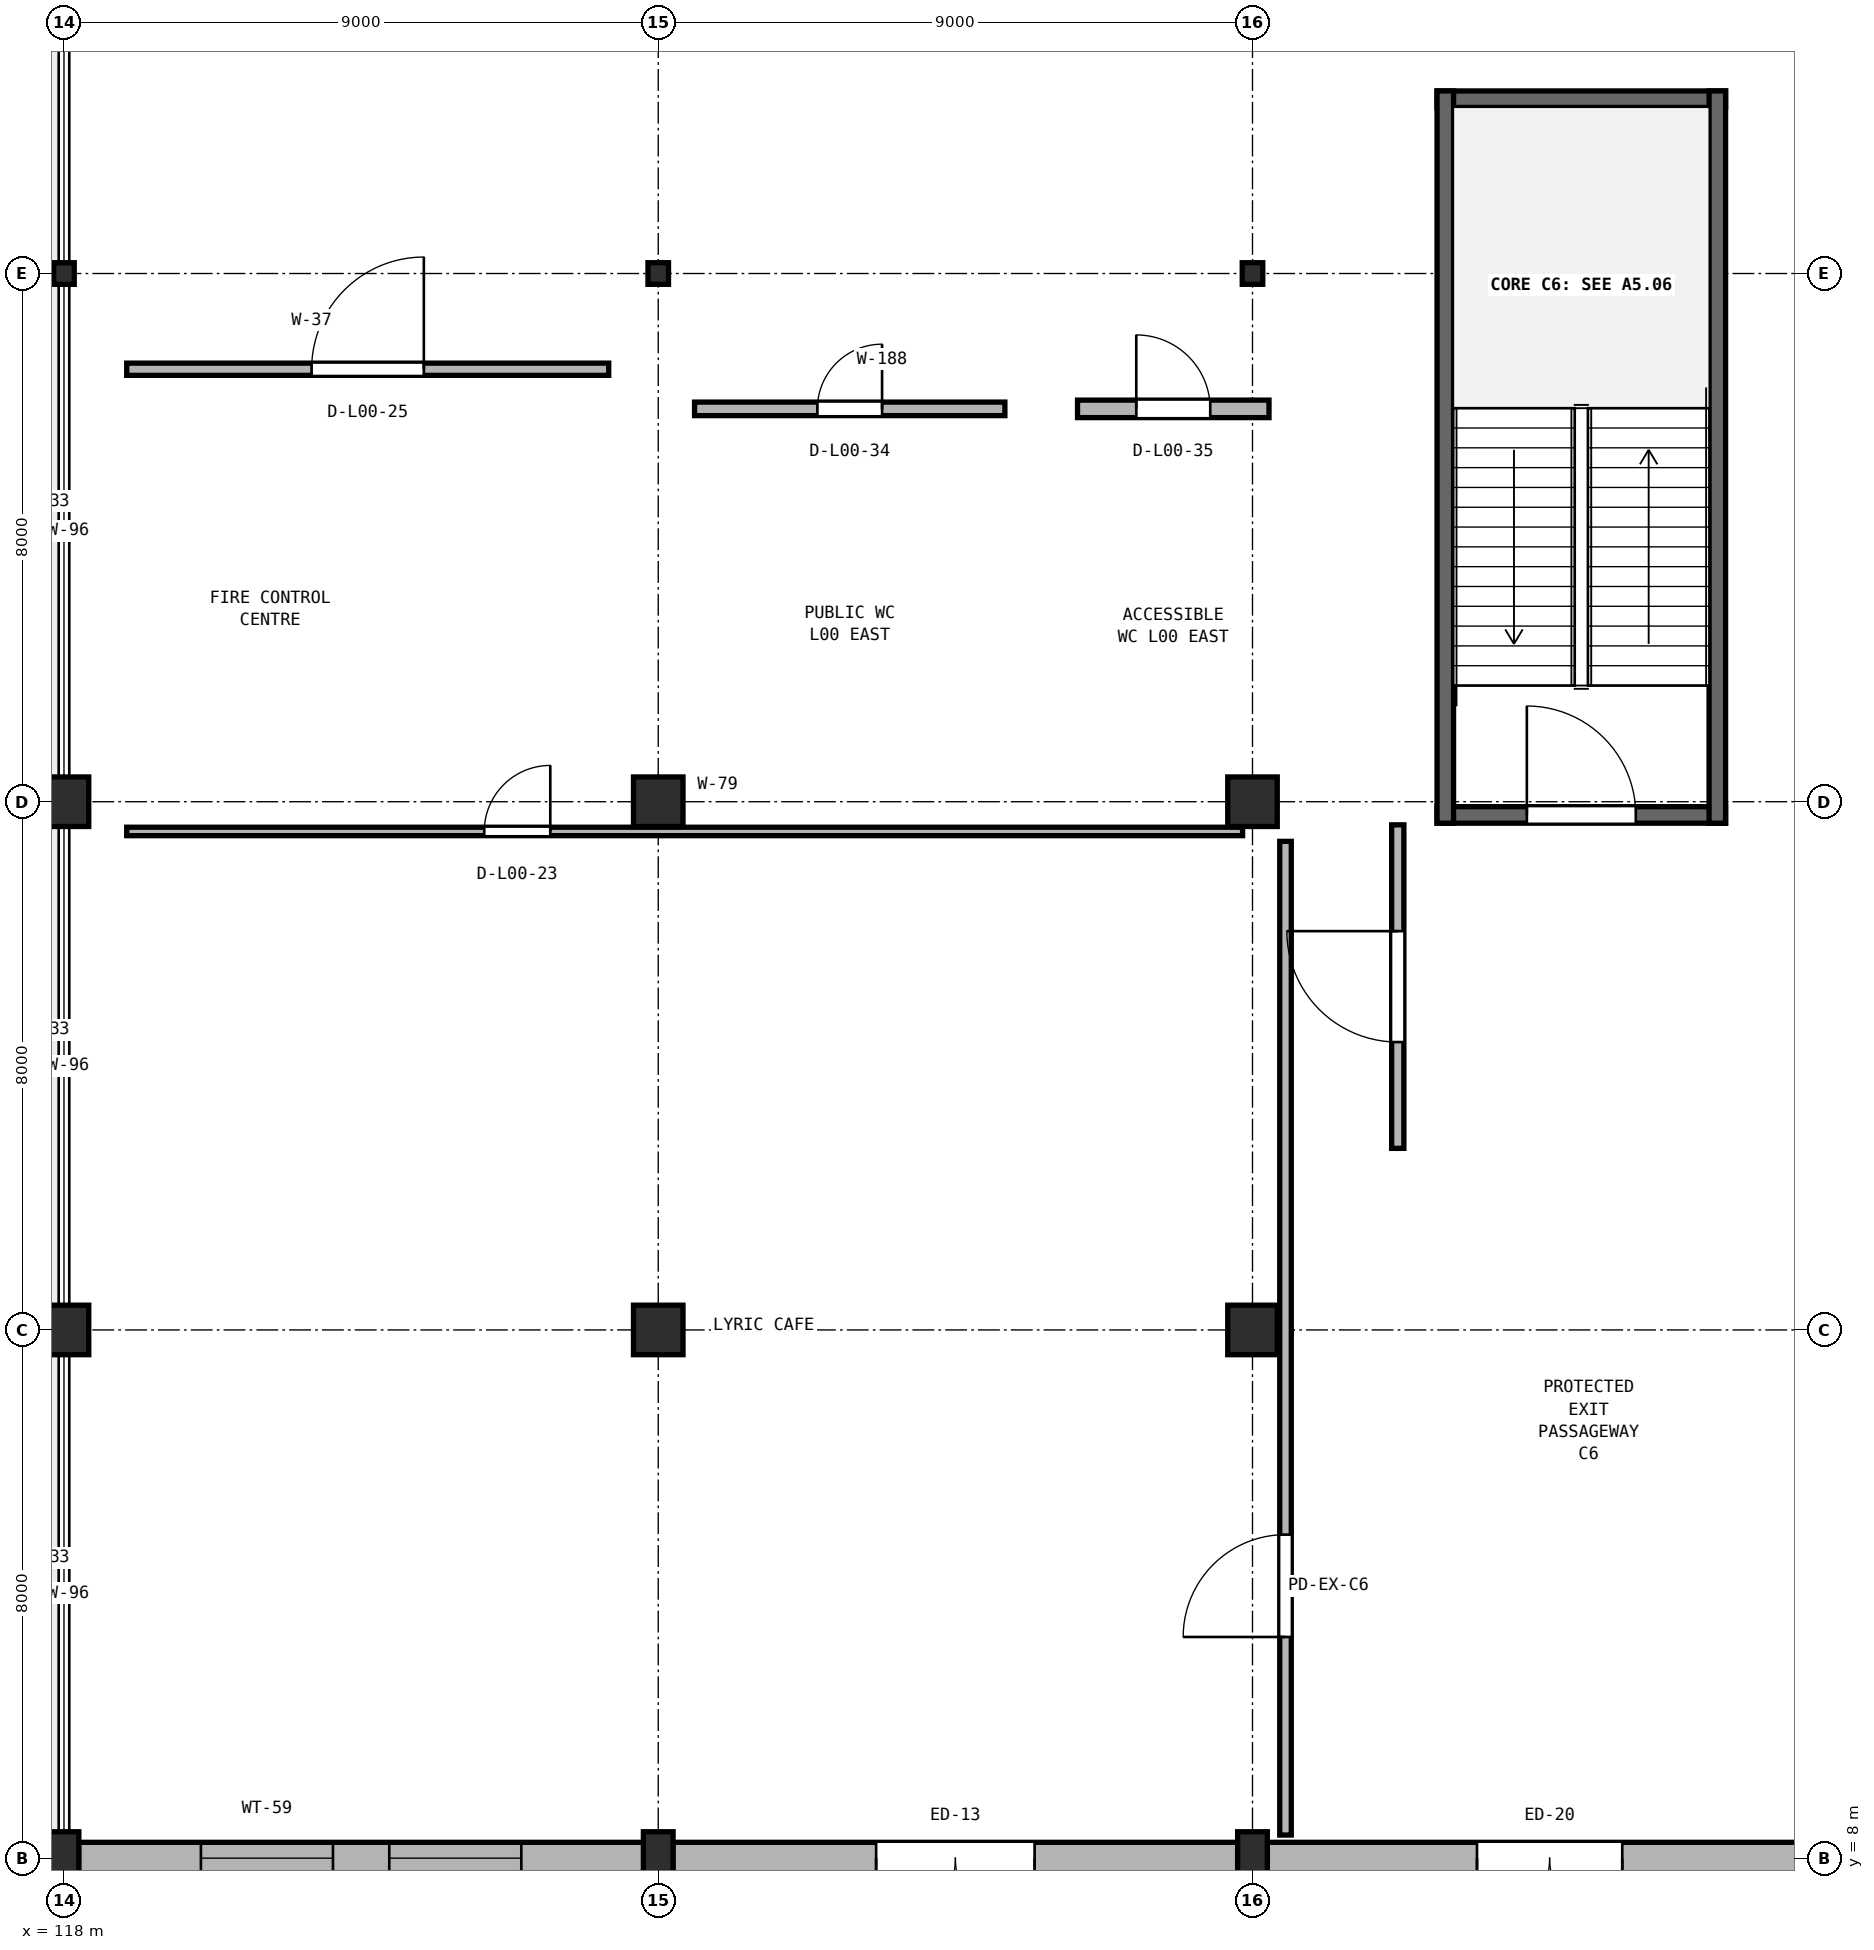
"""IFC4 building model, lengths in metres.
Left out: names, types, materials, properties, quantities, classifications, styles, units other than length and angle.
Written with IfcOpenShell. Run it as: python <this file> out.ifc"""

import sys

from ifc_helpers import new_model, si_unit, direction, frame, frame_2d, origin, origin_2d, place, context, subcontext, project, spatial, rectangle, i_section, extrude, element, fill, save


model = new_model("IFC4")
c1 = context("Model", 3, precision=1e-05, world=origin(), true_north=direction((0.0, 1.0)))
c2 = subcontext(c1, "Body", "Model", "MODEL_VIEW")
j1 = project(units=[si_unit("LENGTHUNIT", "METRE"), si_unit("PLANEANGLEUNIT", "RADIAN")], contexts=[c1])
p1 = place(None, origin())
s1 = spatial("IfcSite", under=j1, at=p1, CompositionType="ELEMENT")
p2 = place(p1, origin())
s2 = spatial("IfcBuilding", under=s1, at=p2, CompositionType="ELEMENT")
p3 = place(p2, origin())
s3 = spatial("IfcBuildingStorey", under=s2, at=p3, CompositionType="ELEMENT", Elevation=0.0)
p4 = place(p3, frame((118.0, 8.0, 0.0), z_axis=(0.0, 0.0, 1.0), x_axis=(1.0, 0.0, 0.0)))
e1 = element("IfcColumn", 1, at=p4, inside=s3, PredefinedType="PILASTER", context=c2, shape_type="SweptSolid", body=[
    extrude(rectangle(XDim=0.45, YDim=0.8, at=origin_2d()), origin(), (0.0, 0.0, 1.0), 5.12),
])
for number, where, z_axis, x_axis in (
    (2, (118.0, 16.0, 0.0), (0.0, 0.0, 1.0), (1.0, 0.0, 0.0)),
    (3, (118.0, 24.0, 0.0), (0.0, 0.0, 1.0), (1.0, 0.0, 0.0)),
):
    element("IfcColumn", number, at=place(p3, frame(where, z_axis=z_axis, x_axis=x_axis)), inside=s3, PredefinedType="COLUMN", context=c2, shape_type="SweptSolid", body=[
        extrude(rectangle(XDim=0.75, YDim=0.75, at=origin_2d()), origin(), (0.0, 0.0, 1.0), 5.12),
    ])
p5 = place(p3, frame((118.0, 32.0, 0.0), z_axis=(0.0, 0.0, 1.0), x_axis=(1.0, 0.0, 0.0)))
e4 = element("IfcColumn", 4, at=p5, inside=s3, PredefinedType="COLUMN", context=c2, shape_type="SweptSolid", body=[
    extrude(i_section(OverallWidth=0.311, OverallDepth=0.327, WebThickness=0.016, FlangeThickness=0.025, FilletRadius=0.017, at=origin_2d()), origin(), (0.0, 0.0, 1.0), 5.12),
])
p6 = place(p3, frame((127.0, 8.0, 0.0), z_axis=(0.0, 0.0, 1.0), x_axis=(1.0, 0.0, 0.0)))
e5 = element("IfcColumn", 5, at=p6, inside=s3, PredefinedType="PILASTER", context=c2, shape_type="SweptSolid", body=[
    extrude(rectangle(XDim=0.45, YDim=0.8, at=origin_2d()), origin(), (0.0, 0.0, 1.0), 5.12),
])
for number, where, z_axis, x_axis in (
    (6, (127.0, 16.0, 0.0), (0.0, 0.0, 1.0), (1.0, 0.0, 0.0)),
    (7, (127.0, 24.0, 0.0), (0.0, 0.0, 1.0), (1.0, 0.0, 0.0)),
):
    element("IfcColumn", number, at=place(p3, frame(where, z_axis=z_axis, x_axis=x_axis)), inside=s3, PredefinedType="COLUMN", context=c2, shape_type="SweptSolid", body=[
        extrude(rectangle(XDim=0.75, YDim=0.75, at=origin_2d()), origin(), (0.0, 0.0, 1.0), 5.12),
    ])
p7 = place(p3, frame((127.0, 32.0, 0.0), z_axis=(0.0, 0.0, 1.0), x_axis=(1.0, 0.0, 0.0)))
e8 = element("IfcColumn", 8, at=p7, inside=s3, PredefinedType="COLUMN", context=c2, shape_type="SweptSolid", body=[
    extrude(i_section(OverallWidth=0.311, OverallDepth=0.327, WebThickness=0.016, FlangeThickness=0.025, FilletRadius=0.017, at=origin_2d()), origin(), (0.0, 0.0, 1.0), 5.12),
])
p8 = place(p3, frame((136.0, 8.0, 0.0), z_axis=(0.0, 0.0, 1.0), x_axis=(1.0, 0.0, 0.0)))
e9 = element("IfcColumn", 9, at=p8, inside=s3, PredefinedType="PILASTER", context=c2, shape_type="SweptSolid", body=[
    extrude(rectangle(XDim=0.45, YDim=0.8, at=origin_2d()), origin(), (0.0, 0.0, 1.0), 5.12),
])
for number, where, z_axis, x_axis in (
    (10, (136.0, 16.0, 0.0), (0.0, 0.0, 1.0), (1.0, 0.0, 0.0)),
    (11, (136.0, 24.0, 0.0), (0.0, 0.0, 1.0), (1.0, 0.0, 0.0)),
):
    element("IfcColumn", number, at=place(p3, frame(where, z_axis=z_axis, x_axis=x_axis)), inside=s3, PredefinedType="COLUMN", context=c2, shape_type="SweptSolid", body=[
        extrude(rectangle(XDim=0.75, YDim=0.75, at=origin_2d()), origin(), (0.0, 0.0, 1.0), 5.12),
    ])
p9 = place(p3, frame((136.0, 32.0, 0.0), z_axis=(0.0, 0.0, 1.0), x_axis=(1.0, 0.0, 0.0)))
e12 = element("IfcColumn", 12, at=p9, inside=s3, PredefinedType="COLUMN", context=c2, shape_type="SweptSolid", body=[
    extrude(i_section(OverallWidth=0.311, OverallDepth=0.327, WebThickness=0.016, FlangeThickness=0.025, FilletRadius=0.017, at=origin_2d()), origin(), (0.0, 0.0, 1.0), 5.12),
])
p10 = place(p3, frame((118.221, 8.0, 0.0), z_axis=(0.0, 0.0, 1.0), x_axis=(1.0, 0.0, 0.0)))
e13 = element("IfcWall", 13, at=p10, inside=s3, PredefinedType="SOLIDWALL", context=c2, shape_type="SweptSolid", body=[
    extrude(rectangle(XDim=8.558, YDim=0.48, at=frame_2d((4.279, 0.0))), origin(), (0.0, 0.0, 1.0), 4.731),
])
p11 = place(p10, frame((1.853, 0.0, 0.75)))
e14 = element("IfcOpeningElement", 14, at=p11, cuts=e13, PredefinedType="OPENING", context=c2, shape_type="SweptSolid", body=[
    extrude(rectangle(XDim=2.0, YDim=2.9, at=frame_2d((1.0, 1.45))), frame((0.0, 0.25, 0.0), z_axis=(0.0, -1.0, 0.0), x_axis=(1.0, 0.0, 0.0)), (0.0, 0.0, 1.0), 0.5),
])
p12 = place(p10, frame((4.705, 0.0, 0.75)))
e15 = element("IfcOpeningElement", 15, at=p12, cuts=e13, PredefinedType="OPENING", context=c2, shape_type="SweptSolid", body=[
    extrude(rectangle(XDim=2.0, YDim=2.9, at=frame_2d((1.0, 1.45))), frame((0.0, 0.25, 0.0), z_axis=(0.0, -1.0, 0.0), x_axis=(1.0, 0.0, 0.0)), (0.0, 0.0, 1.0), 0.5),
])
p13 = place(p3, frame((135.779, 8.0, 0.0), z_axis=(0.0, 0.0, 1.0), x_axis=(-1.0, 0.0, 0.0)))
e16 = element("IfcWall", 16, at=p13, inside=s3, PredefinedType="SOLIDWALL", context=c2, shape_type="SweptSolid", body=[
    extrude(rectangle(XDim=8.558, YDim=0.48, at=frame_2d((4.279, 0.0))), origin(), (0.0, 0.0, 1.0), 4.731),
])
p14 = place(p13, frame((3.079, 0.0, 0.0)))
e17 = element("IfcOpeningElement", 17, at=p14, cuts=e16, PredefinedType="OPENING", context=c2, shape_type="SweptSolid", body=[
    extrude(rectangle(XDim=2.4, YDim=2.5, at=frame_2d((1.2, 1.25))), frame((0.0, 0.25, 0.0), z_axis=(0.0, -1.0, 0.0), x_axis=(1.0, 0.0, 0.0)), (0.0, 0.0, 1.0), 0.5),
])
p15 = place(p3, frame((144.779, 8.0, 0.0), z_axis=(0.0, 0.0, 1.0), x_axis=(-1.0, 0.0, 0.0)))
e18 = element("IfcWall", 18, at=p15, inside=s3, PredefinedType="SOLIDWALL", context=c2, shape_type="SweptSolid", body=[
    extrude(rectangle(XDim=8.558, YDim=0.48, at=frame_2d((4.279, 0.0))), origin(), (0.0, 0.0, 1.0), 4.731),
])
p16 = place(p15, frame((3.179, 0.0, 0.0)))
e19 = element("IfcOpeningElement", 19, at=p16, cuts=e18, PredefinedType="OPENING", context=c2, shape_type="SweptSolid", body=[
    extrude(rectangle(XDim=2.2, YDim=2.4, at=frame_2d((1.1, 1.2))), frame((0.0, 0.25, 0.0), z_axis=(0.0, -1.0, 0.0), x_axis=(1.0, 0.0, 0.0)), (0.0, 0.0, 1.0), 0.5),
])
p17 = place(p3, frame((138.795, 23.8, 0.0), z_axis=(0.0, 0.0, 1.0), x_axis=(1.0, 0.0, 0.0)))
e20 = element("IfcWall", 20, at=p17, inside=s3, PredefinedType="SHEAR", context=c2, shape_type="SweptSolid", body=[
    extrude(rectangle(XDim=4.37, YDim=0.25, at=frame_2d((2.185, 0.0))), origin(), (0.0, 0.0, 1.0), 5.12),
])
p18 = place(p17, frame((1.36, 0.0, 0.0)))
e21 = element("IfcOpeningElement", 21, at=p18, cuts=e20, PredefinedType="OPENING", context=c2, shape_type="SweptSolid", body=[
    extrude(rectangle(XDim=1.65, YDim=2.22, at=frame_2d((0.825, 1.11))), frame((0.0, 0.135, 0.0), z_axis=(0.0, -1.0, 0.0), x_axis=(1.0, 0.0, 0.0)), (0.0, 0.0, 1.0), 0.27),
])
p19 = place(p3, frame((138.795, 34.64, 0.0), z_axis=(0.0, 0.0, 1.0), x_axis=(1.0, 0.0, 0.0)))
e22 = element("IfcWall", 22, at=p19, inside=s3, PredefinedType="SHEAR", context=c2, shape_type="SweptSolid", body=[
    extrude(rectangle(XDim=4.37, YDim=0.25, at=frame_2d((2.185, 0.0))), origin(), (0.0, 0.0, 1.0), 5.12),
])
for number, where, z_axis, x_axis in (
    (23, (138.92, 23.675, 0.0), (0.0, 0.0, 1.0), (0.0, 1.0, 0.0)),
    (24, (143.04, 23.675, 0.0), (0.0, 0.0, 1.0), (0.0, 1.0, 0.0)),
):
    element("IfcWall", number, at=place(p3, frame(where, z_axis=z_axis, x_axis=x_axis)), inside=s3, PredefinedType="SHEAR", context=c2, shape_type="SweptSolid", body=[
        extrude(rectangle(XDim=11.09, YDim=0.25, at=frame_2d((5.545, 0.0))), origin(), (0.0, 0.0, 1.0), 5.12),
    ])
p20 = place(p3, frame((138.2, 18.75, 0.0), z_axis=(0.0, 0.0, 1.0), x_axis=(0.0, 1.0, 0.0)))
e25 = element("IfcWall", 25, at=p20, inside=s3, PredefinedType="PARTITIONING", context=c2, shape_type="SweptSolid", body=[
    extrude(rectangle(XDim=4.9, YDim=0.185, at=frame_2d((2.45, 0.0))), origin(), (0.0, 0.0, 1.0), 5.07),
])
p21 = place(p20, frame((1.61, 0.0, 0.0)))
e26 = element("IfcOpeningElement", 26, at=p21, cuts=e25, PredefinedType="OPENING", context=c2, shape_type="SweptSolid", body=[
    extrude(rectangle(XDim=1.68, YDim=2.25, at=frame_2d((0.84, 1.125))), frame((0.0, 0.103, 0.0), z_axis=(0.0, -1.0, 0.0), x_axis=(1.0, 0.0, 0.0)), (0.0, 0.0, 1.0), 0.205),
])
p22 = place(p3, frame((118.95, 23.55, 0.0), z_axis=(0.0, 0.0, 1.0), x_axis=(1.0, 0.0, 0.0)))
e27 = element("IfcWall", 27, at=p22, inside=s3, PredefinedType="PARTITIONING", context=c2, shape_type="SweptSolid", body=[
    extrude(rectangle(XDim=16.9, YDim=0.128, at=frame_2d((8.45, 0.0))), origin(), (0.0, 0.0, 1.0), 4.479),
])
p23 = place(p22, frame((5.415, 0.0, 0.0)))
e28 = element("IfcOpeningElement", 28, at=p23, cuts=e27, PredefinedType="OPENING", context=c2, shape_type="SweptSolid", body=[
    extrude(rectangle(XDim=1.0, YDim=2.15, at=frame_2d((0.5, 1.075))), frame((0.0, 0.074, 0.0), z_axis=(0.0, -1.0, 0.0), x_axis=(1.0, 0.0, 0.0)), (0.0, 0.0, 1.0), 0.148),
])
p24 = place(p3, frame((118.95, 30.55, 0.0), z_axis=(0.0, 0.0, 1.0), x_axis=(1.0, 0.0, 0.0)))
e29 = element("IfcWall", 29, at=p24, inside=s3, PredefinedType="PARTITIONING", context=c2, shape_type="SweptSolid", body=[
    extrude(rectangle(XDim=7.3, YDim=0.185, at=frame_2d((3.65, 0.0))), origin(), (0.0, 0.0, 1.0), 5.07),
])
p25 = place(p24, frame((2.8, 0.0, 0.0)))
e30 = element("IfcOpeningElement", 30, at=p25, cuts=e29, PredefinedType="OPENING", context=c2, shape_type="SweptSolid", body=[
    extrude(rectangle(XDim=1.7, YDim=2.25, at=frame_2d((0.85, 1.125))), frame((0.0, 0.103, 0.0), z_axis=(0.0, -1.0, 0.0), x_axis=(1.0, 0.0, 0.0)), (0.0, 0.0, 1.0), 0.205),
])
p26 = place(p3, frame((127.55, 29.95, 0.0), z_axis=(0.0, 0.0, 1.0), x_axis=(1.0, 0.0, 0.0)))
e31 = element("IfcWall", 31, at=p26, inside=s3, PredefinedType="PLUMBINGWALL", context=c2, shape_type="SweptSolid", body=[
    extrude(rectangle(XDim=4.7, YDim=0.205, at=frame_2d((2.35, 0.0))), origin(), (0.0, 0.0, 1.0), 5.07),
])
p27 = place(p26, frame((1.86, 0.0, 0.0)))
e32 = element("IfcOpeningElement", 32, at=p27, cuts=e31, PredefinedType="OPENING", context=c2, shape_type="SweptSolid", body=[
    extrude(rectangle(XDim=0.98, YDim=2.14, at=frame_2d((0.49, 1.07))), frame((0.0, 0.113, 0.0), z_axis=(0.0, -1.0, 0.0), x_axis=(1.0, 0.0, 0.0)), (0.0, 0.0, 1.0), 0.225),
])
p28 = place(p3, frame((133.35, 29.95, 0.0), z_axis=(0.0, 0.0, 1.0), x_axis=(1.0, 0.0, 0.0)))
e33 = element("IfcWall", 33, at=p28, inside=s3, PredefinedType="PLUMBINGWALL", context=c2, shape_type="SweptSolid", body=[
    extrude(rectangle(XDim=2.9, YDim=0.265, at=frame_2d((1.45, 0.0))), origin(), (0.0, 0.0, 1.0), 5.07),
])
p29 = place(p28, frame((0.89, 0.0, 0.0)))
e34 = element("IfcOpeningElement", 34, at=p29, cuts=e33, PredefinedType="OPENING", context=c2, shape_type="SweptSolid", body=[
    extrude(rectangle(XDim=1.12, YDim=2.16, at=frame_2d((0.56, 1.08))), frame((0.0, 0.142, 0.0), z_axis=(0.0, -1.0, 0.0), x_axis=(1.0, 0.0, 0.0)), (0.0, 0.0, 1.0), 0.285),
])
p30 = place(p3, frame((136.5, 8.35, 0.0), z_axis=(0.0, 0.0, 1.0), x_axis=(0.0, 1.0, 0.0)))
e35 = element("IfcWall", 35, at=p30, inside=s3, PredefinedType="PARTITIONING", context=c2, shape_type="SweptSolid", body=[
    extrude(rectangle(XDim=15.05, YDim=0.175, at=frame_2d((7.525, 0.0))), origin(), (0.0, 0.0, 1.0), 5.08),
])
p31 = place(p30, frame((3.0, 0.0, 0.0)))
e36 = element("IfcOpeningElement", 36, at=p31, cuts=e35, PredefinedType="OPENING", context=c2, shape_type="SweptSolid", body=[
    extrude(rectangle(XDim=1.55, YDim=2.22, at=frame_2d((0.775, 1.11))), frame((0.0, 0.097, 0.0), z_axis=(0.0, -1.0, 0.0), x_axis=(1.0, 0.0, 0.0)), (0.0, 0.0, 1.0), 0.195),
])
p32 = place(p11, origin())
e37 = element("IfcWindow", 37, at=p32, inside=s3, PartitioningType="SINGLE_PANEL", PredefinedType="WINDOW", context=c2, shape_type="SweptSolid", body=[
    extrude(rectangle(XDim=2.0, YDim=2.9, at=frame_2d((1.0, 1.45))), frame((0.0, 0.03, 0.0), z_axis=(0.0, -1.0, 0.0), x_axis=(1.0, 0.0, 0.0)), (0.0, 0.0, 1.0), 0.06),
])
fill(e14, e37)
p33 = place(p12, origin())
e38 = element("IfcWindow", 38, at=p33, inside=s3, PartitioningType="SINGLE_PANEL", PredefinedType="WINDOW", context=c2, shape_type="SweptSolid", body=[
    extrude(rectangle(XDim=2.0, YDim=2.9, at=frame_2d((1.0, 1.45))), frame((0.0, 0.03, 0.0), z_axis=(0.0, -1.0, 0.0), x_axis=(1.0, 0.0, 0.0)), (0.0, 0.0, 1.0), 0.06),
])
fill(e15, e38)
p34 = place(p14, origin())
e39 = element("IfcDoor", 39, at=p34, inside=s3, OperationType="DOUBLE_DOOR_SINGLE_SWING", PredefinedType="DOOR", context=c2, shape_type="SweptSolid", body=[
    extrude(rectangle(XDim=2.4, YDim=2.5, at=frame_2d((1.2, 1.25))), frame((0.0, 0.025, 0.0), z_axis=(0.0, -1.0, 0.0), x_axis=(1.0, 0.0, 0.0)), (0.0, 0.0, 1.0), 0.05),
])
fill(e17, e39)
p35 = place(p16, origin())
e40 = element("IfcDoor", 40, at=p35, inside=s3, OperationType="DOUBLE_DOOR_SINGLE_SWING", PredefinedType="DOOR", context=c2, shape_type="SweptSolid", body=[
    extrude(rectangle(XDim=2.2, YDim=2.4, at=frame_2d((1.1, 1.2))), frame((0.0, 0.025, 0.0), z_axis=(0.0, -1.0, 0.0), x_axis=(1.0, 0.0, 0.0)), (0.0, 0.0, 1.0), 0.05),
])
fill(e19, e40)
p36 = place(p18, origin())
e41 = element("IfcDoor", 41, at=p36, inside=s3, OperationType="SINGLE_SWING_LEFT", PredefinedType="DOOR", context=c2, shape_type="SweptSolid", body=[
    extrude(rectangle(XDim=1.65, YDim=2.22, at=frame_2d((0.825, 1.11))), frame((0.0, 0.025, 0.0), z_axis=(0.0, -1.0, 0.0), x_axis=(1.0, 0.0, 0.0)), (0.0, 0.0, 1.0), 0.05),
])
fill(e21, e41)
p37 = place(p21, origin())
e42 = element("IfcDoor", 42, at=p37, inside=s3, OperationType="SINGLE_SWING_RIGHT", PredefinedType="DOOR", context=c2, shape_type="SweptSolid", body=[
    extrude(rectangle(XDim=1.68, YDim=2.25, at=frame_2d((0.84, 1.125))), frame((0.0, 0.025, 0.0), z_axis=(0.0, -1.0, 0.0), x_axis=(1.0, 0.0, 0.0)), (0.0, 0.0, 1.0), 0.05),
])
fill(e26, e42)
p38 = place(p23, origin())
e43 = element("IfcDoor", 43, at=p38, inside=s3, OperationType="SINGLE_SWING_RIGHT", PredefinedType="DOOR", context=c2, shape_type="SweptSolid", body=[
    extrude(rectangle(XDim=1.0, YDim=2.15, at=frame_2d((0.5, 1.075))), frame((0.0, 0.025, 0.0), z_axis=(0.0, -1.0, 0.0), x_axis=(1.0, 0.0, 0.0)), (0.0, 0.0, 1.0), 0.05),
])
fill(e28, e43)
p39 = place(p25, origin())
e44 = element("IfcDoor", 44, at=p39, inside=s3, OperationType="SINGLE_SWING_RIGHT", PredefinedType="DOOR", context=c2, shape_type="SweptSolid", body=[
    extrude(rectangle(XDim=1.7, YDim=2.25, at=frame_2d((0.85, 1.125))), frame((0.0, 0.025, 0.0), z_axis=(0.0, -1.0, 0.0), x_axis=(1.0, 0.0, 0.0)), (0.0, 0.0, 1.0), 0.05),
])
fill(e30, e44)
p40 = place(p27, origin())
e45 = element("IfcDoor", 45, at=p40, inside=s3, OperationType="SINGLE_SWING_RIGHT", PredefinedType="DOOR", context=c2, shape_type="SweptSolid", body=[
    extrude(rectangle(XDim=0.98, YDim=2.14, at=frame_2d((0.49, 1.07))), frame((0.0, 0.025, 0.0), z_axis=(0.0, -1.0, 0.0), x_axis=(1.0, 0.0, 0.0)), (0.0, 0.0, 1.0), 0.05),
])
fill(e32, e45)
p41 = place(p29, origin())
e46 = element("IfcDoor", 46, at=p41, inside=s3, OperationType="SINGLE_SWING_LEFT", PredefinedType="DOOR", context=c2, shape_type="SweptSolid", body=[
    extrude(rectangle(XDim=1.12, YDim=2.16, at=frame_2d((0.56, 1.08))), frame((0.0, 0.025, 0.0), z_axis=(0.0, -1.0, 0.0), x_axis=(1.0, 0.0, 0.0)), (0.0, 0.0, 1.0), 0.05),
])
fill(e34, e46)
p42 = place(p31, origin())
e47 = element("IfcDoor", 47, at=p42, inside=s3, OperationType="SINGLE_SWING_LEFT", PredefinedType="DOOR", context=c2, shape_type="SweptSolid", body=[
    extrude(rectangle(XDim=1.55, YDim=2.22, at=frame_2d((0.775, 1.11))), frame((0.0, 0.025, 0.0), z_axis=(0.0, -1.0, 0.0), x_axis=(1.0, 0.0, 0.0)), (0.0, 0.0, 1.0), 0.05),
])
fill(e36, e47)
save(model, sys.argv[1])
